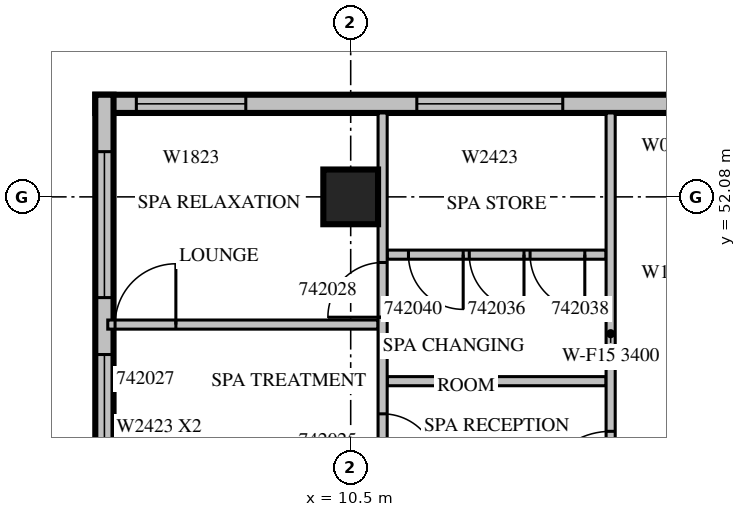
"""IFC4 building model, lengths in metres.
Left out: names, types, materials, properties, quantities, classifications, styles, units other than length and angle.
Written with IfcOpenShell. Run it as: python <this file> out.ifc"""

import sys

from ifc_helpers import new_model, si_unit, direction, frame, frame_2d, origin, origin_2d, place, context, subcontext, project, spatial, rectangle, extrude, source, transform, mapped, element, fill, save


model = new_model("IFC4")
c1 = context("Model", 3, precision=1e-05, world=origin(), true_north=direction((0.0, 1.0)))
c2 = subcontext(c1, "Body", "Model", "MODEL_VIEW")
j1 = project(units=[si_unit("LENGTHUNIT", "METRE"), si_unit("PLANEANGLEUNIT", "RADIAN")], contexts=[c1])
p1 = place(None, origin())
s1 = spatial("IfcSite", under=j1, at=p1, CompositionType="ELEMENT")
p2 = place(p1, origin())
s2 = spatial("IfcBuilding", under=s1, at=p2, CompositionType="ELEMENT")
p3 = place(p2, frame((0.0, 0.0, 193.0)))
s3 = spatial("IfcBuildingStorey", under=s2, at=p3, CompositionType="ELEMENT", Elevation=193.0)
m1 = source(origin(), c2, "Body", "SweptSolid", [
    extrude(rectangle(XDim=0.9, YDim=0.9, at=origin_2d()), origin(), (0.0, 0.0, 1.0), 3.8),
])
p4 = place(p3, frame((10.5, 52.08, 0.0), z_axis=(0.0, 0.0, 1.0), x_axis=(1.0, 0.0, 0.0)))
e1 = element("IfcColumn", 1, at=p4, inside=s3, PredefinedType="COLUMN", context=c2, shape_type="MappedRepresentation", body=[
    mapped(m1, transform((0.0, 0.0, 0.0), scale=1.0)),
])
m2 = source(origin(), c2, "Body", "SweptSolid", [
    extrude(rectangle(XDim=10.5, YDim=0.3, at=frame_2d((5.25, 0.0))), origin(), (0.0, 0.0, 1.0), 3.4),
])
p5 = place(p3, frame((16.8, 53.61, 0.0), z_axis=(0.0, 0.0, 1.0), x_axis=(-1.0, 0.0, 0.0)))
e2 = element("IfcWall", 2, at=p5, inside=s3, PredefinedType="STANDARD", context=c2, shape_type="MappedRepresentation", body=[
    mapped(m2, transform((0.0, 0.0, 0.0), scale=1.0)),
])
m3 = source(origin(), c2, "Body", "SweptSolid", [
    extrude(rectangle(XDim=1.8, YDim=2.3, at=frame_2d((0.9, 1.15))), frame((0.0, 0.16, 0.0), z_axis=(0.0, -1.0, 0.0), x_axis=(1.0, 0.0, 0.0)), (0.0, 0.0, 1.0), 0.32),
])
p6 = place(p5, frame((8.025, 0.0, 0.6)))
e3 = element("IfcOpeningElement", 3, at=p6, cuts=e2, PredefinedType="OPENING", context=c2, shape_type="MappedRepresentation", body=[
    mapped(m3, transform((0.0, 0.0, 0.0), scale=1.0)),
])
m4 = source(origin(), c2, "Body", "SweptSolid", [
    extrude(rectangle(XDim=2.4, YDim=2.3, at=frame_2d((1.2, 1.15))), frame((0.0, 0.16, 0.0), z_axis=(0.0, -1.0, 0.0), x_axis=(1.0, 0.0, 0.0)), (0.0, 0.0, 1.0), 0.32),
])
p7 = place(p5, frame((2.812, 0.0, 0.6)))
e4 = element("IfcOpeningElement", 4, at=p7, cuts=e2, PredefinedType="OPENING", context=c2, shape_type="MappedRepresentation", body=[
    mapped(m4, transform((0.0, 0.0, 0.0), scale=1.0)),
])
m5 = source(origin(), c2, "Body", "SweptSolid", [
    extrude(rectangle(XDim=9.91, YDim=0.3, at=frame_2d((4.955, 0.0))), origin(), (0.0, 0.0, 1.0), 3.4),
])
p8 = place(p3, frame((6.45, 53.76, 0.0), z_axis=(0.0, 0.0, 1.0), x_axis=(0.0, -1.0, 0.0)))
e5 = element("IfcWall", 5, at=p8, inside=s3, PredefinedType="STANDARD", context=c2, shape_type="MappedRepresentation", body=[
    mapped(m5, transform((0.0, 0.0, 0.0), scale=1.0)),
])
p9 = place(p8, frame((4.272, 0.0, 0.6)))
e6 = element("IfcOpeningElement", 6, at=p9, cuts=e5, PredefinedType="OPENING", context=c2, shape_type="MappedRepresentation", body=[
    mapped(m4, transform((0.0, 0.0, 0.0), scale=1.0)),
])
p10 = place(p8, frame((0.936, 0.0, 0.6)))
e7 = element("IfcOpeningElement", 7, at=p10, cuts=e5, PredefinedType="OPENING", context=c2, shape_type="MappedRepresentation", body=[
    mapped(m4, transform((0.0, 0.0, 0.0), scale=1.0)),
])
m6 = source(origin(), c2, "Body", "SweptSolid", [
    extrude(rectangle(XDim=4.445, YDim=0.15, at=frame_2d((2.223, 0.0))), origin(), (0.0, 0.0, 1.0), 3.4),
])
p11 = place(p3, frame((10.95, 49.98, 0.0), z_axis=(0.0, 0.0, 1.0), x_axis=(-1.0, 0.0, 0.0)))
e8 = element("IfcWall", 8, at=p11, inside=s3, PredefinedType="PARTITIONING", context=c2, shape_type="MappedRepresentation", body=[
    mapped(m6, transform((0.0, 0.0, 0.0), scale=1.0)),
])
m7 = source(origin(), c2, "Body", "SweptSolid", [
    extrude(rectangle(XDim=1.0, YDim=2.1, at=frame_2d((0.5, 1.05))), frame((0.0, 0.085, 0.0), z_axis=(0.0, -1.0, 0.0), x_axis=(1.0, 0.0, 0.0)), (0.0, 0.0, 1.0), 0.17),
])
p12 = place(p11, frame((3.325, 0.0, 0.0)))
e9 = element("IfcOpeningElement", 9, at=p12, cuts=e8, PredefinedType="OPENING", context=c2, shape_type="MappedRepresentation", body=[
    mapped(m7, transform((0.0, 0.0, 0.0), scale=1.0)),
])
m8 = source(origin(), c2, "Body", "SweptSolid", [
    extrude(rectangle(XDim=3.6, YDim=0.15, at=frame_2d((1.8, 0.0))), origin(), (0.0, 0.0, 1.0), 3.4),
])
p13 = place(p3, frame((14.7, 49.049, 0.0), z_axis=(0.0, 0.0, 1.0), x_axis=(-1.0, 0.0, 0.0)))
e10 = element("IfcWall", 10, at=p13, inside=s3, PredefinedType="PARTITIONING", context=c2, shape_type="MappedRepresentation", body=[
    mapped(m8, transform((0.0, 0.0, 0.0), scale=1.0)),
])
p14 = place(p3, frame((14.7, 51.13, 0.0), z_axis=(0.0, 0.0, 1.0), x_axis=(-1.0, 0.0, 0.0)))
e11 = element("IfcWall", 11, at=p14, inside=s3, PredefinedType="PARTITIONING", context=c2, shape_type="MappedRepresentation", body=[
    mapped(m8, transform((0.0, 0.0, 0.0), scale=1.0)),
])
m9 = source(origin(), c2, "Body", "SweptSolid", [
    extrude(rectangle(XDim=0.9, YDim=2.1, at=frame_2d((0.45, 1.05))), frame((0.0, 0.085, 0.0), z_axis=(0.0, -1.0, 0.0), x_axis=(1.0, 0.0, 0.0)), (0.0, 0.0, 1.0), 0.17),
])
p15 = place(p14, frame((1.35, 0.0, 0.0)))
e12 = element("IfcOpeningElement", 12, at=p15, cuts=e11, PredefinedType="OPENING", context=c2, shape_type="MappedRepresentation", body=[
    mapped(m9, transform((0.0, 0.0, 0.0), scale=1.0)),
])
p16 = place(p14, frame((0.35, 0.0, 0.0)))
e13 = element("IfcOpeningElement", 13, at=p16, cuts=e11, PredefinedType="OPENING", context=c2, shape_type="MappedRepresentation", body=[
    mapped(m9, transform((0.0, 0.0, 0.0), scale=1.0)),
])
p17 = place(p14, frame((2.35, 0.0, 0.0)))
e14 = element("IfcOpeningElement", 14, at=p17, cuts=e11, PredefinedType="OPENING", context=c2, shape_type="MappedRepresentation", body=[
    mapped(m9, transform((0.0, 0.0, 0.0), scale=1.0)),
])
m10 = source(origin(), c2, "Body", "SweptSolid", [
    extrude(rectangle(XDim=7.26, YDim=0.15, at=frame_2d((3.63, 0.0))), origin(), (0.0, 0.0, 1.0), 3.4),
])
p18 = place(p3, frame((11.025, 46.2, 0.0), z_axis=(0.0, 0.0, 1.0), x_axis=(0.0, 1.0, 0.0)))
e15 = element("IfcWall", 15, at=p18, inside=s3, PredefinedType="PARTITIONING", context=c2, shape_type="MappedRepresentation", body=[
    mapped(m10, transform((0.0, 0.0, 0.0), scale=1.0)),
])
p19 = place(p18, frame((1.412, 0.0, 0.0)))
e16 = element("IfcOpeningElement", 16, at=p19, cuts=e15, PredefinedType="OPENING", context=c2, shape_type="MappedRepresentation", body=[
    mapped(m9, transform((0.0, 0.0, 0.0), scale=1.0)),
])
p20 = place(p18, frame((0.46, 0.0, 0.0)))
e17 = element("IfcOpeningElement", 17, at=p20, cuts=e15, PredefinedType="OPENING", context=c2, shape_type="MappedRepresentation", body=[
    mapped(m9, transform((0.0, 0.0, 0.0), scale=1.0)),
])
p21 = place(p18, frame((3.901, 0.0, 0.0)))
e18 = element("IfcOpeningElement", 18, at=p21, cuts=e15, PredefinedType="OPENING", context=c2, shape_type="MappedRepresentation", body=[
    mapped(m9, transform((0.0, 0.0, 0.0), scale=1.0)),
])
p22 = place(p3, frame((14.775, 46.2, 0.0), z_axis=(0.0, 0.0, 1.0), x_axis=(0.0, 1.0, 0.0)))
e19 = element("IfcWall", 19, at=p22, inside=s3, PredefinedType="PARTITIONING", context=c2, shape_type="MappedRepresentation", body=[
    mapped(m10, transform((0.0, 0.0, 0.0), scale=1.0)),
])
m11 = source(origin(), c2, "Body", "SweptSolid", [
    extrude(rectangle(XDim=1.2, YDim=2.1, at=frame_2d((0.6, 1.05))), frame((0.0, 0.085, 0.0), z_axis=(0.0, -1.0, 0.0), x_axis=(1.0, 0.0, 0.0)), (0.0, 0.0, 1.0), 0.17),
])
p23 = place(p22, frame((0.825, 0.0, 0.0)))
e20 = element("IfcOpeningElement", 20, at=p23, cuts=e19, PredefinedType="OPENING", context=c2, shape_type="MappedRepresentation", body=[
    mapped(m11, transform((0.0, 0.0, 0.0), scale=1.0)),
])
m12 = source(origin(), c2, "Body", "SweptSolid", [
    extrude(rectangle(XDim=1.8, YDim=2.3, at=frame_2d((0.9, 1.15))), frame((0.0, 0.03, 0.0), z_axis=(0.0, -1.0, 0.0), x_axis=(1.0, 0.0, 0.0)), (0.0, 0.0, 1.0), 0.06),
])
p24 = place(p6, origin())
e21 = element("IfcWindow", 21, at=p24, inside=s3, PartitioningType="SINGLE_PANEL", PredefinedType="WINDOW", context=c2, shape_type="MappedRepresentation", body=[
    mapped(m12, transform((0.0, 0.0, 0.0), scale=1.0)),
])
fill(e3, e21)
m13 = source(origin(), c2, "Body", "SweptSolid", [
    extrude(rectangle(XDim=2.4, YDim=2.3, at=frame_2d((1.2, 1.15))), frame((0.0, 0.03, 0.0), z_axis=(0.0, -1.0, 0.0), x_axis=(1.0, 0.0, 0.0)), (0.0, 0.0, 1.0), 0.06),
])
p25 = place(p7, origin())
e22 = element("IfcWindow", 22, at=p25, inside=s3, PartitioningType="SINGLE_PANEL", PredefinedType="WINDOW", context=c2, shape_type="MappedRepresentation", body=[
    mapped(m13, transform((0.0, 0.0, 0.0), scale=1.0)),
])
fill(e4, e22)
p26 = place(p9, origin())
e23 = element("IfcWindow", 23, at=p26, inside=s3, PartitioningType="SINGLE_PANEL", PredefinedType="WINDOW", context=c2, shape_type="MappedRepresentation", body=[
    mapped(m13, transform((0.0, 0.0, 0.0), scale=1.0)),
])
fill(e6, e23)
p27 = place(p10, origin())
e24 = element("IfcWindow", 24, at=p27, inside=s3, PartitioningType="SINGLE_PANEL", PredefinedType="WINDOW", context=c2, shape_type="MappedRepresentation", body=[
    mapped(m13, transform((0.0, 0.0, 0.0), scale=1.0)),
])
fill(e7, e24)
m14 = source(origin(), c2, "Body", "SweptSolid", [
    extrude(rectangle(XDim=1.2, YDim=2.1, at=frame_2d((0.6, 1.05))), frame((0.0, 0.025, 0.0), z_axis=(0.0, -1.0, 0.0), x_axis=(1.0, 0.0, 0.0)), (0.0, 0.0, 1.0), 0.05),
])
p28 = place(p23, origin())
e25 = element("IfcDoor", 25, at=p28, inside=s3, OperationType="SINGLE_SWING_LEFT", PredefinedType="DOOR", context=c2, shape_type="MappedRepresentation", body=[
    mapped(m14, transform((0.0, 0.0, 0.0), scale=1.0)),
])
fill(e20, e25)
m15 = source(origin(), c2, "Body", "SweptSolid", [
    extrude(rectangle(XDim=0.9, YDim=2.1, at=frame_2d((0.45, 1.05))), frame((0.0, 0.025, 0.0), z_axis=(0.0, -1.0, 0.0), x_axis=(1.0, 0.0, 0.0)), (0.0, 0.0, 1.0), 0.05),
])
p29 = place(p19, origin())
e26 = element("IfcDoor", 26, at=p29, inside=s3, OperationType="SINGLE_SWING_RIGHT", PredefinedType="DOOR", context=c2, shape_type="MappedRepresentation", body=[
    mapped(m15, transform((0.0, 0.0, 0.0), scale=1.0)),
])
fill(e16, e26)
m16 = source(origin(), c2, "Body", "SweptSolid", [
    extrude(rectangle(XDim=1.0, YDim=2.1, at=frame_2d((0.5, 1.05))), frame((0.0, 0.025, 0.0), z_axis=(0.0, -1.0, 0.0), x_axis=(1.0, 0.0, 0.0)), (0.0, 0.0, 1.0), 0.05),
])
p30 = place(p12, origin())
e27 = element("IfcDoor", 27, at=p30, inside=s3, OperationType="SINGLE_SWING_RIGHT", PredefinedType="DOOR", context=c2, shape_type="MappedRepresentation", body=[
    mapped(m16, transform((0.0, 0.0, 0.0), scale=1.0)),
])
fill(e9, e27)
p31 = place(p21, origin())
e28 = element("IfcDoor", 28, at=p31, inside=s3, OperationType="SINGLE_SWING_LEFT", PredefinedType="DOOR", context=c2, shape_type="MappedRepresentation", body=[
    mapped(m15, transform((0.0, 0.0, 0.0), scale=1.0)),
])
fill(e18, e28)
p32 = place(p15, origin())
e29 = element("IfcDoor", 29, at=p32, inside=s3, OperationType="SINGLE_SWING_LEFT", PredefinedType="DOOR", context=c2, shape_type="MappedRepresentation", body=[
    mapped(m15, transform((0.0, 0.0, 0.0), scale=1.0)),
])
fill(e12, e29)
p33 = place(p16, origin())
e30 = element("IfcDoor", 30, at=p33, inside=s3, OperationType="SINGLE_SWING_LEFT", PredefinedType="DOOR", context=c2, shape_type="MappedRepresentation", body=[
    mapped(m15, transform((0.0, 0.0, 0.0), scale=1.0)),
])
fill(e13, e30)
p34 = place(p17, origin())
e31 = element("IfcDoor", 31, at=p34, inside=s3, OperationType="SINGLE_SWING_LEFT", PredefinedType="DOOR", context=c2, shape_type="MappedRepresentation", body=[
    mapped(m15, transform((0.0, 0.0, 0.0), scale=1.0)),
])
fill(e14, e31)
save(model, sys.argv[1])
